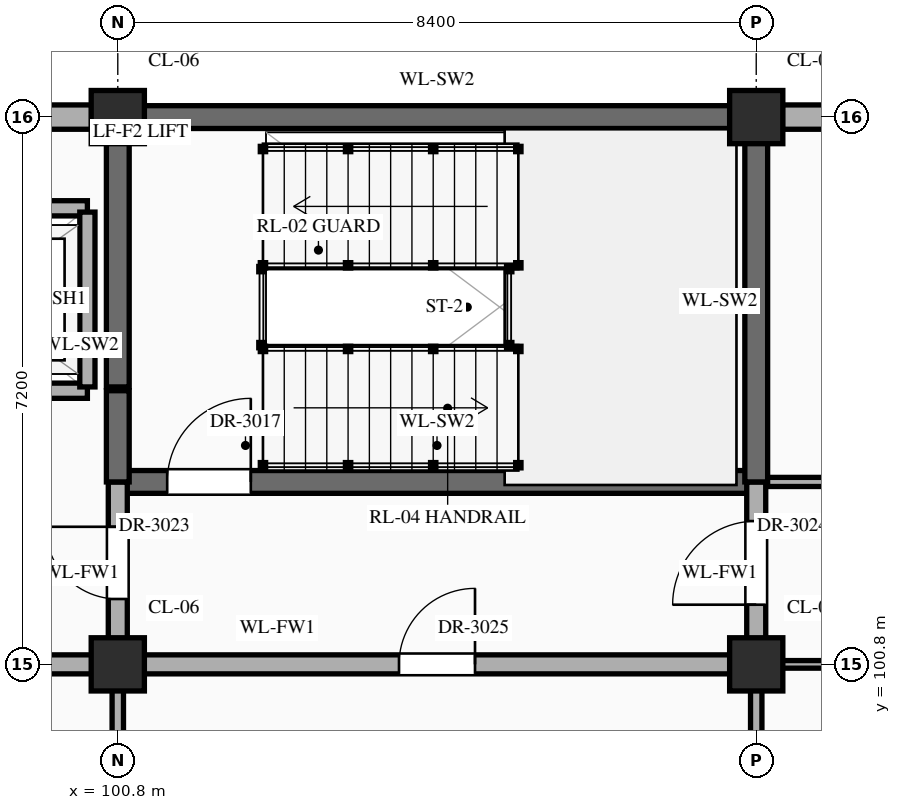
"""IFC4 building model, lengths in metres.
Left out: names, types, materials, properties, quantities, classifications, styles, units other than length and angle.
Written with IfcOpenShell. Run it as: python <this file> out.ifc"""

import sys

from ifc_helpers import new_model, si_unit, direction, frame, frame_2d, origin, origin_2d, place, context, subcontext, project, spatial, rectangle, extrude, element, fill, save


model = new_model("IFC4")
c1 = context("Model", 3, precision=1e-05, world=origin(), true_north=direction((0.0, 1.0)))
c2 = subcontext(c1, "Body", "Model", "MODEL_VIEW")
j1 = project(units=[si_unit("LENGTHUNIT", "METRE"), si_unit("PLANEANGLEUNIT", "RADIAN")], contexts=[c1])
p1 = place(None, origin())
s1 = spatial("IfcSite", under=j1, at=p1, CompositionType="ELEMENT")
p2 = place(p1, origin())
s2 = spatial("IfcBuilding", under=s1, at=p2, CompositionType="ELEMENT")
p3 = place(p2, frame((0.0, 0.0, 51.9)))
s3 = spatial("IfcBuildingStorey", under=s2, at=p3, CompositionType="ELEMENT", Elevation=51.9)
for number, where, z_axis, x_axis in (
    (1, (100.8, 100.8, 0.0), (0.0, 0.0, 1.0), (1.0, 0.0, 0.0)),
    (2, (100.8, 108.0, 0.0), (0.0, 0.0, 1.0), (1.0, 0.0, 0.0)),
    (3, (109.2, 100.8, 0.0), (0.0, 0.0, 1.0), (1.0, 0.0, 0.0)),
    (4, (109.2, 108.0, 0.0), (0.0, 0.0, 1.0), (1.0, 0.0, 0.0)),
):
    element("IfcColumn", number, at=place(p3, frame(where, z_axis=z_axis, x_axis=x_axis)), inside=s3, PredefinedType="COLUMN", context=c2, shape_type="SweptSolid", body=[
        extrude(rectangle(XDim=0.7, YDim=0.7, at=origin_2d()), origin(), (0.0, 0.0, 1.0), 4.2),
    ])
p4 = place(p3, frame((92.745, 108.0, 0.0), z_axis=(0.0, 0.0, 1.0), x_axis=(1.0, 0.0, 0.0)))
e5 = element("IfcWall", 5, at=p4, inside=s3, PredefinedType="STANDARD", context=c2, shape_type="SweptSolid", body=[
    extrude(rectangle(XDim=7.71, YDim=0.32, at=frame_2d((3.855, 0.0))), origin(), (0.0, 0.0, 1.0), 3.31),
])
p5 = place(p3, frame((101.145, 108.0, 0.0), z_axis=(0.0, 0.0, 1.0), x_axis=(1.0, 0.0, 0.0)))
e6 = element("IfcWall", 6, at=p5, inside=s3, PredefinedType="SHEAR", context=c2, shape_type="SweptSolid", body=[
    extrude(rectangle(XDim=7.71, YDim=0.3, at=frame_2d((3.855, 0.0))), origin(), (0.0, 0.0, 1.0), 3.96),
])
p6 = place(p3, frame((109.545, 108.0, 0.0), z_axis=(0.0, 0.0, 1.0), x_axis=(1.0, 0.0, 0.0)))
e7 = element("IfcWall", 7, at=p6, inside=s3, PredefinedType="STANDARD", context=c2, shape_type="SweptSolid", body=[
    extrude(rectangle(XDim=7.71, YDim=0.32, at=frame_2d((3.855, 0.0))), origin(), (0.0, 0.0, 1.0), 3.31),
])
p7 = place(p6, frame((5.255, 0.0, 0.55)))
e8 = element("IfcOpeningElement", 8, at=p7, cuts=e7, PredefinedType="OPENING", context=c2, shape_type="SweptSolid", body=[
    extrude(rectangle(XDim=1.2, YDim=1.38, at=frame_2d((0.6, 0.69))), frame((0.0, 0.172, 0.0), z_axis=(0.0, -1.0, 0.0), x_axis=(1.0, 0.0, 0.0)), (0.0, 0.0, 1.0), 0.344),
])
p8 = place(p3, frame((96.6, 100.8, 0.0), z_axis=(0.0, 0.0, 1.0), x_axis=(1.0, 0.0, 0.0)))
e9 = element("IfcWall", 9, at=p8, inside=s3, PredefinedType="STANDARD", context=c2, shape_type="SweptSolid", body=[
    extrude(rectangle(XDim=12.6, YDim=0.25, at=frame_2d((6.3, 0.0))), origin(), (0.0, 0.0, 1.0), 3.11),
])
p9 = place(p8, frame((7.9, 0.0, 0.0)))
e10 = element("IfcOpeningElement", 10, at=p9, cuts=e9, PredefinedType="OPENING", context=c2, shape_type="SweptSolid", body=[
    extrude(rectangle(XDim=1.0, YDim=2.2, at=frame_2d((0.5, 1.1))), frame((0.0, 0.137, 0.0), z_axis=(0.0, -1.0, 0.0), x_axis=(1.0, 0.0, 0.0)), (0.0, 0.0, 1.0), 0.274),
])
p10 = place(p3, frame((109.2, 100.8, 0.0), z_axis=(0.0, 0.0, 1.0), x_axis=(1.0, 0.0, 0.0)))
e11 = element("IfcWall", 11, at=p10, inside=s3, PredefinedType="STANDARD", context=c2, shape_type="SweptSolid", body=[
    extrude(rectangle(XDim=8.36, YDim=0.1, at=frame_2d((4.18, 0.0))), origin(), (0.0, 0.0, 1.0), 3.11),
])
p11 = place(p10, frame((1.375, 0.0, 0.0)))
e12 = element("IfcOpeningElement", 12, at=p11, cuts=e11, PredefinedType="OPENING", context=c2, shape_type="SweptSolid", body=[
    extrude(rectangle(XDim=0.92, YDim=2.15, at=frame_2d((0.46, 1.075))), frame((0.0, 0.062, 0.0), z_axis=(0.0, -1.0, 0.0), x_axis=(1.0, 0.0, 0.0)), (0.0, 0.0, 1.0), 0.124),
])
p12 = place(p10, frame((4.12, 0.0, 0.0)))
e13 = element("IfcOpeningElement", 13, at=p12, cuts=e11, PredefinedType="OPENING", context=c2, shape_type="SweptSolid", body=[
    extrude(rectangle(XDim=0.96, YDim=2.2, at=frame_2d((0.48, 1.1))), frame((0.0, 0.062, 0.0), z_axis=(0.0, -1.0, 0.0), x_axis=(1.0, 0.0, 0.0)), (0.0, 0.0, 1.0), 0.124),
])
p13 = place(p10, frame((6.465, 0.0, 0.0)))
e14 = element("IfcOpeningElement", 14, at=p13, cuts=e11, PredefinedType="OPENING", context=c2, shape_type="SweptSolid", body=[
    extrude(rectangle(XDim=1.0, YDim=2.25, at=frame_2d((0.5, 1.125))), frame((0.0, 0.062, 0.0), z_axis=(0.0, -1.0, 0.0), x_axis=(1.0, 0.0, 0.0)), (0.0, 0.0, 1.0), 0.124),
])
p14 = place(p3, frame((100.8, 103.2, 0.0), z_axis=(0.0, 0.0, 1.0), x_axis=(1.0, 0.0, 0.0)))
e15 = element("IfcWall", 15, at=p14, inside=s3, PredefinedType="SHEAR", context=c2, shape_type="SweptSolid", body=[
    extrude(rectangle(XDim=8.4, YDim=0.3, at=frame_2d((4.2, 0.0))), origin(), (0.0, 0.0, 1.0), 3.96),
])
p15 = place(p14, frame((0.65, 0.0, 0.0)))
e16 = element("IfcOpeningElement", 16, at=p15, cuts=e15, PredefinedType="OPENING", context=c2, shape_type="SweptSolid", body=[
    extrude(rectangle(XDim=1.1, YDim=2.2, at=frame_2d((0.55, 1.1))), frame((0.0, 0.162, 0.0), z_axis=(0.0, -1.0, 0.0), x_axis=(1.0, 0.0, 0.0)), (0.0, 0.0, 1.0), 0.324),
])
p16 = place(p3, frame((109.2, 103.2, 0.0), z_axis=(0.0, 0.0, 1.0), x_axis=(1.0, 0.0, 0.0)))
e17 = element("IfcWall", 17, at=p16, inside=s3, PredefinedType="STANDARD", context=c2, shape_type="SweptSolid", body=[
    extrude(rectangle(XDim=8.36, YDim=0.12, at=frame_2d((4.18, 0.0))), origin(), (0.0, 0.0, 1.0), 3.96),
])
p17 = place(p16, frame((3.75, 0.0, 0.0)))
e18 = element("IfcOpeningElement", 18, at=p17, cuts=e17, PredefinedType="OPENING", context=c2, shape_type="SweptSolid", body=[
    extrude(rectangle(XDim=0.86, YDim=2.1, at=frame_2d((0.43, 1.05))), frame((0.0, 0.072, 0.0), z_axis=(0.0, -1.0, 0.0), x_axis=(1.0, 0.0, 0.0)), (0.0, 0.0, 1.0), 0.144),
])
p18 = place(p3, frame((97.4, 104.4, 0.0), z_axis=(0.0, 0.0, 1.0), x_axis=(1.0, 0.0, 0.0)))
e19 = element("IfcWall", 19, at=p18, inside=s3, PredefinedType="STANDARD", context=c2, shape_type="SweptSolid", body=[
    extrude(rectangle(XDim=3.0, YDim=0.2, at=frame_2d((1.5, 0.0))), origin(), (0.0, 0.0, 1.0), 3.96),
])
p19 = place(p18, frame((0.9, 0.0, 0.0)))
e20 = element("IfcOpeningElement", 20, at=p19, cuts=e19, PredefinedType="OPENING", context=c2, shape_type="SweptSolid", body=[
    extrude(rectangle(XDim=1.2, YDim=2.15, at=frame_2d((0.6, 1.075))), frame((0.0, 0.112, 0.0), z_axis=(0.0, -1.0, 0.0), x_axis=(1.0, 0.0, 0.0)), (0.0, 0.0, 1.0), 0.224),
])
p20 = place(p3, frame((97.4, 106.8, 0.0), z_axis=(0.0, 0.0, 1.0), x_axis=(1.0, 0.0, 0.0)))
e21 = element("IfcWall", 21, at=p20, inside=s3, PredefinedType="STANDARD", context=c2, shape_type="SweptSolid", body=[
    extrude(rectangle(XDim=3.0, YDim=0.2, at=frame_2d((1.5, 0.0))), origin(), (0.0, 0.0, 1.0), 3.96),
])
p21 = place(p3, frame((100.4, 104.45, 0.0), z_axis=(0.0, 0.0, 1.0), x_axis=(0.0, 1.0, 0.0)))
e22 = element("IfcWall", 22, at=p21, inside=s3, PredefinedType="STANDARD", context=c2, shape_type="SweptSolid", body=[
    extrude(rectangle(XDim=2.3, YDim=0.2, at=frame_2d((1.15, 0.0))), origin(), (0.0, 0.0, 1.0), 3.96),
])
p22 = place(p3, frame((100.8, 96.0, 0.0), z_axis=(0.0, 0.0, 1.0), x_axis=(0.0, 1.0, 0.0)))
e23 = element("IfcWall", 23, at=p22, inside=s3, PredefinedType="STANDARD", context=c2, shape_type="SweptSolid", body=[
    extrude(rectangle(XDim=4.8, YDim=0.15, at=frame_2d((2.4, 0.0))), origin(), (0.0, 0.0, 1.0), 3.21),
])
p23 = place(p3, frame((100.8, 100.8, 0.0), z_axis=(0.0, 0.0, 1.0), x_axis=(0.0, 1.0, 0.0)))
e24 = element("IfcWall", 24, at=p23, inside=s3, PredefinedType="STANDARD", context=c2, shape_type="SweptSolid", body=[
    extrude(rectangle(XDim=2.4, YDim=0.25, at=frame_2d((1.2, 0.0))), origin(), (0.0, 0.0, 1.0), 3.21),
])
p24 = place(p23, frame((0.86, 0.0, 0.0)))
e25 = element("IfcOpeningElement", 25, at=p24, cuts=e24, PredefinedType="OPENING", context=c2, shape_type="SweptSolid", body=[
    extrude(rectangle(XDim=0.95, YDim=2.15, at=frame_2d((0.475, 1.075))), frame((0.0, 0.137, 0.0), z_axis=(0.0, -1.0, 0.0), x_axis=(1.0, 0.0, 0.0)), (0.0, 0.0, 1.0), 0.274),
])
p25 = place(p3, frame((100.8, 103.2, 0.0), z_axis=(0.0, 0.0, 1.0), x_axis=(0.0, 1.0, 0.0)))
e26 = element("IfcWall", 26, at=p25, inside=s3, PredefinedType="SHEAR", context=c2, shape_type="SweptSolid", body=[
    extrude(rectangle(XDim=1.2, YDim=0.3, at=frame_2d((0.6, 0.0))), origin(), (0.0, 0.0, 1.0), 3.96),
])
p26 = place(p3, frame((100.8, 104.45, 0.0), z_axis=(0.0, 0.0, 1.0), x_axis=(0.0, 1.0, 0.0)))
e27 = element("IfcWall", 27, at=p26, inside=s3, PredefinedType="SHEAR", context=c2, shape_type="SweptSolid", body=[
    extrude(rectangle(XDim=3.46, YDim=0.3, at=frame_2d((1.73, 0.0))), origin(), (0.0, 0.0, 1.0), 3.96),
])
p27 = place(p3, frame((109.2, 96.0, 0.0), z_axis=(0.0, 0.0, 1.0), x_axis=(0.0, 1.0, 0.0)))
e28 = element("IfcWall", 28, at=p27, inside=s3, PredefinedType="STANDARD", context=c2, shape_type="SweptSolid", body=[
    extrude(rectangle(XDim=4.8, YDim=0.15, at=frame_2d((2.4, 0.0))), origin(), (0.0, 0.0, 1.0), 3.21),
])
p28 = place(p3, frame((109.2, 100.8, 0.0), z_axis=(0.0, 0.0, 1.0), x_axis=(0.0, 1.0, 0.0)))
e29 = element("IfcWall", 29, at=p28, inside=s3, PredefinedType="STANDARD", context=c2, shape_type="SweptSolid", body=[
    extrude(rectangle(XDim=2.4, YDim=0.25, at=frame_2d((1.2, 0.0))), origin(), (0.0, 0.0, 1.0), 3.21),
])
p29 = place(p28, frame((0.785, 0.0, 0.0)))
e30 = element("IfcOpeningElement", 30, at=p29, cuts=e29, PredefinedType="OPENING", context=c2, shape_type="SweptSolid", body=[
    extrude(rectangle(XDim=1.1, YDim=2.2, at=frame_2d((0.55, 1.1))), frame((0.0, 0.137, 0.0), z_axis=(0.0, -1.0, 0.0), x_axis=(1.0, 0.0, 0.0)), (0.0, 0.0, 1.0), 0.274),
])
p30 = place(p3, frame((109.2, 103.2, 0.0), z_axis=(0.0, 0.0, 1.0), x_axis=(0.0, 1.0, 0.0)))
e31 = element("IfcWall", 31, at=p30, inside=s3, PredefinedType="SHEAR", context=c2, shape_type="SweptSolid", body=[
    extrude(rectangle(XDim=4.76, YDim=0.3, at=frame_2d((2.38, 0.0))), origin(), (0.0, 0.0, 1.0), 3.96),
])
p31 = place(p15, origin())
e32 = element("IfcDoor", 32, at=p31, inside=s3, OperationType="SINGLE_SWING_RIGHT", PredefinedType="DOOR", context=c2, shape_type="SweptSolid", body=[
    extrude(rectangle(XDim=1.1, YDim=2.2, at=frame_2d((0.55, 1.1))), frame((0.0, 0.025, 0.0), z_axis=(0.0, -1.0, 0.0), x_axis=(1.0, 0.0, 0.0)), (0.0, 0.0, 1.0), 0.05),
])
fill(e16, e32)
p32 = place(p24, origin())
e33 = element("IfcDoor", 33, at=p32, inside=s3, OperationType="SINGLE_SWING_RIGHT", PredefinedType="DOOR", context=c2, shape_type="SweptSolid", body=[
    extrude(rectangle(XDim=0.95, YDim=2.15, at=frame_2d((0.475, 1.075))), frame((0.0, 0.025, 0.0), z_axis=(0.0, -1.0, 0.0), x_axis=(1.0, 0.0, 0.0)), (0.0, 0.0, 1.0), 0.05),
])
fill(e25, e33)
p33 = place(p29, origin())
e34 = element("IfcDoor", 34, at=p33, inside=s3, OperationType="SINGLE_SWING_LEFT", PredefinedType="DOOR", context=c2, shape_type="SweptSolid", body=[
    extrude(rectangle(XDim=1.1, YDim=2.2, at=frame_2d((0.55, 1.1))), frame((0.0, 0.025, 0.0), z_axis=(0.0, -1.0, 0.0), x_axis=(1.0, 0.0, 0.0)), (0.0, 0.0, 1.0), 0.05),
])
fill(e30, e34)
p34 = place(p9, origin())
e35 = element("IfcDoor", 35, at=p34, inside=s3, OperationType="SINGLE_SWING_RIGHT", PredefinedType="DOOR", context=c2, shape_type="SweptSolid", body=[
    extrude(rectangle(XDim=1.0, YDim=2.2, at=frame_2d((0.5, 1.1))), frame((0.0, 0.025, 0.0), z_axis=(0.0, -1.0, 0.0), x_axis=(1.0, 0.0, 0.0)), (0.0, 0.0, 1.0), 0.05),
])
fill(e10, e35)
save(model, sys.argv[1])
